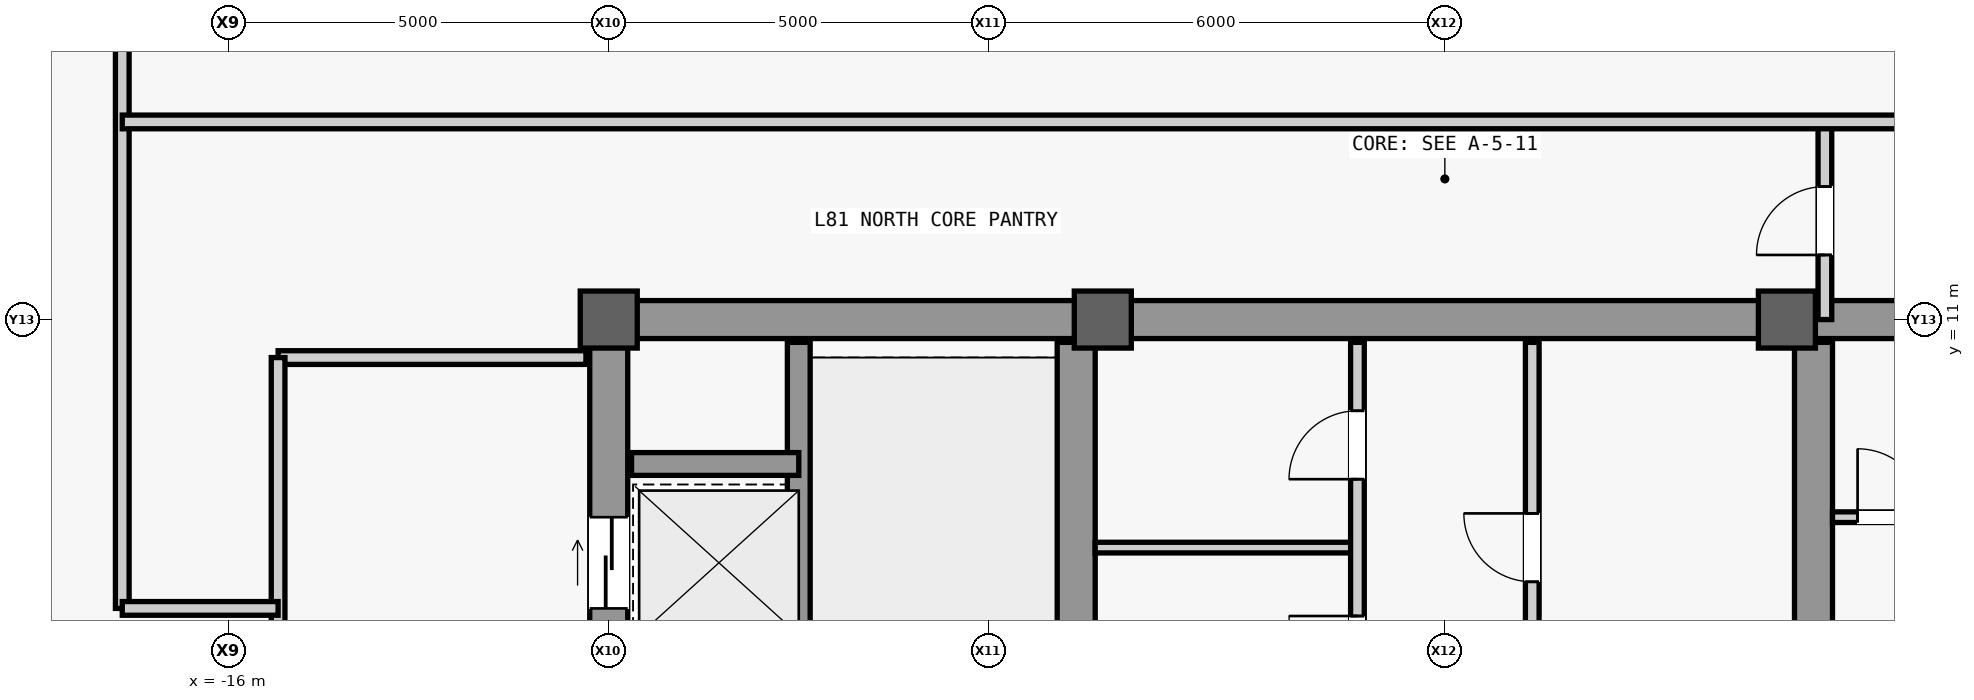
"""IFC4 building model, lengths in metres.
Left out: names, types, materials, properties, quantities, classifications, styles, units other than length and angle.
Written with IfcOpenShell. Run it as: python <this file> out.ifc"""

import sys

from ifc_helpers import new_model, si_unit, direction, frame, frame_2d, origin, origin_2d, place, context, subcontext, project, spatial, rectangle, extrude, source, transform, mapped, element, fill, save


model = new_model("IFC4")
c1 = context("Model", 3, precision=1e-05, world=origin(), true_north=direction((0.0, 1.0)))
c2 = subcontext(c1, "Body", "Model", "MODEL_VIEW")
j1 = project(units=[si_unit("LENGTHUNIT", "METRE"), si_unit("PLANEANGLEUNIT", "RADIAN")], contexts=[c1])
p1 = place(None, origin())
s1 = spatial("IfcSite", under=j1, at=p1, CompositionType="ELEMENT")
p2 = place(p1, origin())
s2 = spatial("IfcBuilding", under=s1, at=p2, CompositionType="ELEMENT")
p3 = place(p2, frame((0.0, 0.0, 342.3)))
s3 = spatial("IfcBuildingStorey", under=s2, at=p3, CompositionType="ELEMENT", Elevation=342.3)
m1 = source(origin(), c2, "Body", "SweptSolid", [
    extrude(rectangle(XDim=22.0, YDim=0.5, at=frame_2d((11.0, 0.0))), origin(), (0.0, 0.0, 1.0), 3.7),
])
p4 = place(p3, frame((-11.0, -11.0, 0.0), z_axis=(0.0, 0.0, 1.0), x_axis=(0.0, 1.0, 0.0)))
e1 = element("IfcWall", 1, at=p4, inside=s3, PredefinedType="SHEAR", context=c2, shape_type="MappedRepresentation", body=[
    mapped(m1, transform((0.0, 0.0, 0.0), scale=1.0)),
])
m2 = source(origin(), c2, "Body", "SweptSolid", [
    extrude(rectangle(XDim=1.1, YDim=2.2, at=frame_2d((0.55, 1.1))), frame((0.0, 0.26, 0.0), z_axis=(0.0, -1.0, 0.0), x_axis=(1.0, 0.0, 0.0)), (0.0, 0.0, 1.0), 0.52),
])
p5 = place(p4, frame((0.8, 0.0, 0.0)))
e2 = element("IfcOpeningElement", 2, at=p5, cuts=e1, PredefinedType="OPENING", context=c2, shape_type="MappedRepresentation", body=[
    mapped(m2, transform((0.0, 0.0, 0.0), scale=1.0)),
])
p6 = place(p4, frame((12.5, 0.0, 0.0)))
e3 = element("IfcOpeningElement", 3, at=p6, cuts=e1, PredefinedType="OPENING", context=c2, shape_type="MappedRepresentation", body=[
    mapped(m2, transform((0.0, 0.0, 0.0), scale=1.0)),
])
m3 = source(origin(), c2, "Body", "SweptSolid", [
    extrude(rectangle(XDim=0.9, YDim=2.15, at=frame_2d((0.45, 1.075))), frame((0.0, 0.26, 0.0), z_axis=(0.0, -1.0, 0.0), x_axis=(1.0, 0.0, 0.0)), (0.0, 0.0, 1.0), 0.52),
])
p7 = place(p4, frame((6.2, 0.0, 0.0)))
e4 = element("IfcOpeningElement", 4, at=p7, cuts=e1, PredefinedType="OPENING", context=c2, shape_type="MappedRepresentation", body=[
    mapped(m3, transform((0.0, 0.0, 0.0), scale=1.0)),
])
p8 = place(p4, frame((8.05, 0.0, 0.0)))
e5 = element("IfcOpeningElement", 5, at=p8, cuts=e1, PredefinedType="OPENING", context=c2, shape_type="MappedRepresentation", body=[
    mapped(m3, transform((0.0, 0.0, 0.0), scale=1.0)),
])
m4 = source(origin(), c2, "Body", "SweptSolid", [
    extrude(rectangle(XDim=1.2, YDim=2.3, at=frame_2d((0.6, 1.15))), frame((0.0, 0.26, 0.0), z_axis=(0.0, -1.0, 0.0), x_axis=(1.0, 0.0, 0.0)), (0.0, 0.0, 1.0), 0.52),
])
p9 = place(p4, frame((14.6, 0.0, 0.0)))
e6 = element("IfcOpeningElement", 6, at=p9, cuts=e1, PredefinedType="OPENING", context=c2, shape_type="MappedRepresentation", body=[
    mapped(m4, transform((0.0, 0.0, 0.0), scale=1.0)),
])
p10 = place(p4, frame((18.2, 0.0, 0.0)))
e7 = element("IfcOpeningElement", 7, at=p10, cuts=e1, PredefinedType="OPENING", context=c2, shape_type="MappedRepresentation", body=[
    mapped(m4, transform((0.0, 0.0, 0.0), scale=1.0)),
])
m5 = source(origin(), c2, "Body", "SweptSolid", [
    extrude(rectangle(XDim=1.3, YDim=2.3, at=frame_2d((0.65, 1.15))), frame((0.0, 0.26, 0.0), z_axis=(0.0, -1.0, 0.0), x_axis=(1.0, 0.0, 0.0)), (0.0, 0.0, 1.0), 0.52),
])
p11 = place(p4, frame((2.7, 0.0, 0.0)))
e8 = element("IfcOpeningElement", 8, at=p11, cuts=e1, PredefinedType="OPENING", context=c2, shape_type="MappedRepresentation", body=[
    mapped(m5, transform((0.0, 0.0, 0.0), scale=1.0)),
])
m6 = source(origin(), c2, "Body", "SweptSolid", [
    extrude(rectangle(XDim=21.4, YDim=0.5, at=frame_2d((10.7, 0.0))), origin(), (0.0, 0.0, 1.0), 3.7),
])
for number, where, z_axis, x_axis in (
    (9, (-4.85, -10.7, 0.0), (0.0, 0.0, 1.0), (0.0, 1.0, 0.0)),
    (10, (4.85, -10.7, 0.0), (0.0, 0.0, 1.0), (0.0, 1.0, 0.0)),
):
    element("IfcWall", number, at=place(p3, frame(where, z_axis=z_axis, x_axis=x_axis)), inside=s3, PredefinedType="SHEAR", context=c2, shape_type="MappedRepresentation", body=[
        mapped(m6, transform((0.0, 0.0, 0.0), scale=1.0)),
    ])
m7 = source(origin(), c2, "Body", "SweptSolid", [
    extrude(rectangle(XDim=5.9, YDim=0.5, at=frame_2d((2.95, 0.0))), origin(), (0.0, 0.0, 1.0), 3.7),
])
p12 = place(p3, frame((-10.75, 11.0, 0.0), z_axis=(0.0, 0.0, 1.0), x_axis=(1.0, 0.0, 0.0)))
e11 = element("IfcWall", 11, at=p12, inside=s3, PredefinedType="SHEAR", context=c2, shape_type="MappedRepresentation", body=[
    mapped(m7, transform((0.0, 0.0, 0.0), scale=1.0)),
])
p13 = place(p3, frame((4.85, 11.0, 0.0), z_axis=(0.0, 0.0, 1.0), x_axis=(1.0, 0.0, 0.0)))
e12 = element("IfcWall", 12, at=p13, inside=s3, PredefinedType="SHEAR", context=c2, shape_type="MappedRepresentation", body=[
    mapped(m7, transform((0.0, 0.0, 0.0), scale=1.0)),
])
m8 = source(origin(), c2, "Body", "SweptSolid", [
    extrude(rectangle(XDim=1.05, YDim=2.2, at=frame_2d((0.525, 1.1))), frame((0.0, 0.26, 0.0), z_axis=(0.0, -1.0, 0.0), x_axis=(1.0, 0.0, 0.0)), (0.0, 0.0, 1.0), 0.52),
])
p14 = place(p13, frame((1.375, 0.0, 0.0)))
e13 = element("IfcOpeningElement", 13, at=p14, cuts=e12, PredefinedType="OPENING", context=c2, shape_type="MappedRepresentation", body=[
    mapped(m8, transform((0.0, 0.0, 0.0), scale=1.0)),
])
m9 = source(origin(), c2, "Body", "SweptSolid", [
    extrude(rectangle(XDim=9.2, YDim=0.5, at=frame_2d((4.6, 0.0))), origin(), (0.0, 0.0, 1.0), 3.7),
])
p15 = place(p3, frame((-4.6, 11.0, 0.0), z_axis=(0.0, 0.0, 1.0), x_axis=(1.0, 0.0, 0.0)))
e14 = element("IfcWall", 14, at=p15, inside=s3, PredefinedType="SHEAR", context=c2, shape_type="MappedRepresentation", body=[
    mapped(m9, transform((0.0, 0.0, 0.0), scale=1.0)),
])
m10 = source(origin(), c2, "Body", "SweptSolid", [
    extrude(rectangle(XDim=0.75, YDim=0.75, at=origin_2d()), origin(), (0.0, 0.0, 1.0), 4.0),
])
for number, where, z_axis, x_axis in (
    (15, (-11.0, 11.0, 0.0), (0.0, 0.0, 1.0), (1.0, 0.0, 0.0)),
    (16, (-4.5, 11.0, 0.0), (0.0, 0.0, 1.0), (1.0, 0.0, 0.0)),
    (17, (4.5, 11.0, 0.0), (0.0, 0.0, 1.0), (1.0, 0.0, 0.0)),
):
    element("IfcColumn", number, at=place(p3, frame(where, z_axis=z_axis, x_axis=x_axis)), inside=s3, PredefinedType="COLUMN", context=c2, shape_type="MappedRepresentation", body=[
        mapped(m10, transform((0.0, 0.0, 0.0), scale=1.0)),
    ])
m11 = source(origin(), c2, "Body", "SweptSolid", [
    extrude(rectangle(XDim=7.75, YDim=0.3, at=frame_2d((3.875, 0.0))), origin(), (0.0, 0.0, 1.0), 3.7),
])
p16 = place(p3, frame((-8.5, 2.95, 0.0), z_axis=(0.0, 0.0, 1.0), x_axis=(0.0, 1.0, 0.0)))
e18 = element("IfcWall", 18, at=p16, inside=s3, PredefinedType="SHEAR", context=c2, shape_type="MappedRepresentation", body=[
    mapped(m11, transform((0.0, 0.0, 0.0), scale=1.0)),
])
m12 = source(origin(), c2, "Body", "SweptSolid", [
    extrude(rectangle(XDim=2.2, YDim=0.3, at=frame_2d((1.1, 0.0))), origin(), (0.0, 0.0, 1.0), 3.7),
])
p17 = place(p3, frame((-10.7, 9.1, 0.0), z_axis=(0.0, 0.0, 1.0), x_axis=(1.0, 0.0, 0.0)))
e19 = element("IfcWall", 19, at=p17, inside=s3, PredefinedType="SHEAR", context=c2, shape_type="MappedRepresentation", body=[
    mapped(m12, transform((0.0, 0.0, 0.0), scale=1.0)),
])
m13 = source(origin(), c2, "Body", "SweptSolid", [
    extrude(rectangle(XDim=3.15, YDim=0.14, at=frame_2d((1.575, 0.0))), origin(), (0.0, 0.0, 1.0), 3.7),
])
p18 = place(p3, frame((5.1, 8.4, 0.0), z_axis=(0.0, 0.0, 1.0), x_axis=(1.0, 0.0, 0.0)))
e20 = element("IfcWall", 20, at=p18, inside=s3, PredefinedType="PARTITIONING", context=c2, shape_type="MappedRepresentation", body=[
    mapped(m13, transform((0.0, 0.0, 0.0), scale=1.0)),
])
m14 = source(origin(), c2, "Body", "SweptSolid", [
    extrude(rectangle(XDim=0.9, YDim=2.15, at=frame_2d((0.45, 1.075))), frame((0.0, 0.08, 0.0), z_axis=(0.0, -1.0, 0.0), x_axis=(1.0, 0.0, 0.0)), (0.0, 0.0, 1.0), 0.16),
])
p19 = place(p18, frame((0.33, 0.0, 0.0)))
e21 = element("IfcOpeningElement", 21, at=p19, cuts=e20, PredefinedType="OPENING", context=c2, shape_type="MappedRepresentation", body=[
    mapped(m14, transform((0.0, 0.0, 0.0), scale=1.0)),
])
p20 = place(p18, frame((1.9, 0.0, 0.0)))
e22 = element("IfcOpeningElement", 22, at=p20, cuts=e20, PredefinedType="OPENING", context=c2, shape_type="MappedRepresentation", body=[
    mapped(m14, transform((0.0, 0.0, 0.0), scale=1.0)),
])
m15 = source(origin(), c2, "Body", "SweptSolid", [
    extrude(rectangle(XDim=4.05, YDim=0.18, at=frame_2d((2.025, 0.0))), origin(), (0.0, 0.0, 1.0), 3.7),
])
p21 = place(p3, frame((-15.35, 10.5, 0.0), z_axis=(0.0, 0.0, 1.0), x_axis=(1.0, 0.0, 0.0)))
e23 = element("IfcWall", 23, at=p21, inside=s3, PredefinedType="PARTITIONING", context=c2, shape_type="MappedRepresentation", body=[
    mapped(m15, transform((0.0, 0.0, 0.0), scale=1.0)),
])
m16 = source(origin(), c2, "Body", "SweptSolid", [
    extrude(rectangle(XDim=16.6, YDim=0.18, at=frame_2d((8.3, 0.0))), origin(), (0.0, 0.0, 1.0), 3.7),
])
p22 = place(p3, frame((-15.35, -6.1, 0.0), z_axis=(0.0, 0.0, 1.0), x_axis=(0.0, 1.0, 0.0)))
e24 = element("IfcWall", 24, at=p22, inside=s3, PredefinedType="PARTITIONING", context=c2, shape_type="MappedRepresentation", body=[
    mapped(m16, transform((0.0, 0.0, 0.0), scale=1.0)),
])
m17 = source(origin(), c2, "Body", "SweptSolid", [
    extrude(rectangle(XDim=1.8, YDim=2.25, at=frame_2d((0.9, 1.125))), frame((0.0, 0.1, 0.0), z_axis=(0.0, -1.0, 0.0), x_axis=(1.0, 0.0, 0.0)), (0.0, 0.0, 1.0), 0.2),
])
p23 = place(p22, frame((2.7, 0.0, 0.0)))
e25 = element("IfcOpeningElement", 25, at=p23, cuts=e24, PredefinedType="OPENING", context=c2, shape_type="MappedRepresentation", body=[
    mapped(m17, transform((0.0, 0.0, 0.0), scale=1.0)),
])
p24 = place(p22, frame((11.0, 0.0, 0.0)))
e26 = element("IfcOpeningElement", 26, at=p24, cuts=e24, PredefinedType="OPENING", context=c2, shape_type="MappedRepresentation", body=[
    mapped(m17, transform((0.0, 0.0, 0.0), scale=1.0)),
])
m18 = source(origin(), c2, "Body", "SweptSolid", [
    extrude(rectangle(XDim=3.45, YDim=0.14, at=frame_2d((1.725, 0.0))), origin(), (0.0, 0.0, 1.0), 3.7),
])
p25 = place(p3, frame((-4.6, 8.0, 0.0), z_axis=(0.0, 0.0, 1.0), x_axis=(1.0, 0.0, 0.0)))
e27 = element("IfcWall", 27, at=p25, inside=s3, PredefinedType="PARTITIONING", context=c2, shape_type="MappedRepresentation", body=[
    mapped(m18, transform((0.0, 0.0, 0.0), scale=1.0)),
])
m19 = source(origin(), c2, "Body", "SweptSolid", [
    extrude(rectangle(XDim=5.4, YDim=0.18, at=frame_2d((2.7, 0.0))), origin(), (0.0, 0.0, 1.0), 3.7),
])
p26 = place(p3, frame((-1.15, 5.3, 0.0), z_axis=(0.0, 0.0, 1.0), x_axis=(0.0, 1.0, 0.0)))
e28 = element("IfcWall", 28, at=p26, inside=s3, PredefinedType="PARTITIONING", context=c2, shape_type="MappedRepresentation", body=[
    mapped(m19, transform((0.0, 0.0, 0.0), scale=1.0)),
])
m20 = source(origin(), c2, "Body", "SweptSolid", [
    extrude(rectangle(XDim=0.9, YDim=2.15, at=frame_2d((0.45, 1.075))), frame((0.0, 0.1, 0.0), z_axis=(0.0, -1.0, 0.0), x_axis=(1.0, 0.0, 0.0)), (0.0, 0.0, 1.0), 0.2),
])
p27 = place(p26, frame((0.9, 0.0, 0.0)))
e29 = element("IfcOpeningElement", 29, at=p27, cuts=e28, PredefinedType="OPENING", context=c2, shape_type="MappedRepresentation", body=[
    mapped(m20, transform((0.0, 0.0, 0.0), scale=1.0)),
])
p28 = place(p26, frame((3.6, 0.0, 0.0)))
e30 = element("IfcOpeningElement", 30, at=p28, cuts=e28, PredefinedType="OPENING", context=c2, shape_type="MappedRepresentation", body=[
    mapped(m20, transform((0.0, 0.0, 0.0), scale=1.0)),
])
p29 = place(p3, frame((1.15, 5.3, 0.0), z_axis=(0.0, 0.0, 1.0), x_axis=(0.0, 1.0, 0.0)))
e31 = element("IfcWall", 31, at=p29, inside=s3, PredefinedType="PARTITIONING", context=c2, shape_type="MappedRepresentation", body=[
    mapped(m19, transform((0.0, 0.0, 0.0), scale=1.0)),
])
p30 = place(p29, frame((2.25, 0.0, 0.0)))
e32 = element("IfcOpeningElement", 32, at=p30, cuts=e31, PredefinedType="OPENING", context=c2, shape_type="MappedRepresentation", body=[
    mapped(m20, transform((0.0, 0.0, 0.0), scale=1.0)),
])
m21 = source(origin(), c2, "Body", "SweptSolid", [
    extrude(rectangle(XDim=8.4, YDim=0.18, at=frame_2d((4.2, 0.0))), origin(), (0.0, 0.0, 1.0), 3.7),
])
p31 = place(p3, frame((-17.4, 7.2, 0.0), z_axis=(0.0, 0.0, 1.0), x_axis=(0.0, 1.0, 0.0)))
e33 = element("IfcWall", 33, at=p31, inside=s3, PredefinedType="PARTITIONING", context=c2, shape_type="MappedRepresentation", body=[
    mapped(m21, transform((0.0, 0.0, 0.0), scale=1.0)),
])
m22 = source(origin(), c2, "Body", "SweptSolid", [
    extrude(rectangle(XDim=2.05, YDim=0.18, at=frame_2d((1.025, 0.0))), origin(), (0.0, 0.0, 1.0), 3.7),
])
p32 = place(p3, frame((-17.4, 7.2, 0.0), z_axis=(0.0, 0.0, 1.0), x_axis=(1.0, 0.0, 0.0)))
e34 = element("IfcWall", 34, at=p32, inside=s3, PredefinedType="PARTITIONING", context=c2, shape_type="MappedRepresentation", body=[
    mapped(m22, transform((0.0, 0.0, 0.0), scale=1.0)),
])
m23 = source(origin(), c2, "Body", "SweptSolid", [
    extrude(rectangle(XDim=2.6, YDim=0.18, at=frame_2d((1.3, 0.0))), origin(), (0.0, 0.0, 1.0), 3.7),
])
p33 = place(p3, frame((5.0, 11.0, 0.0), z_axis=(0.0, 0.0, 1.0), x_axis=(0.0, 1.0, 0.0)))
e35 = element("IfcWall", 35, at=p33, inside=s3, PredefinedType="PARTITIONING", context=c2, shape_type="MappedRepresentation", body=[
    mapped(m23, transform((0.0, 0.0, 0.0), scale=1.0)),
])
p34 = place(p33, frame((0.85, 0.0, 0.0)))
e36 = element("IfcOpeningElement", 36, at=p34, cuts=e35, PredefinedType="OPENING", context=c2, shape_type="MappedRepresentation", body=[
    mapped(m20, transform((0.0, 0.0, 0.0), scale=1.0)),
])
m24 = source(origin(), c2, "Body", "SweptSolid", [
    extrude(rectangle(XDim=32.75, YDim=0.18, at=frame_2d((16.375, 0.0))), origin(), (0.0, 0.0, 1.0), 3.7),
])
p35 = place(p3, frame((-17.4, 13.6, 0.0), z_axis=(0.0, 0.0, 1.0), x_axis=(1.0, 0.0, 0.0)))
e37 = element("IfcWall", 37, at=p35, inside=s3, PredefinedType="PARTITIONING", context=c2, shape_type="MappedRepresentation", body=[
    mapped(m24, transform((0.0, 0.0, 0.0), scale=1.0)),
])
m25 = source(origin(), c2, "Body", "SweptSolid", [
    extrude(rectangle(XDim=1.05, YDim=2.2, at=frame_2d((0.525, 1.1))), frame((0.0, 0.1, 0.0), z_axis=(0.0, -1.0, 0.0), x_axis=(1.0, 0.0, 0.0)), (0.0, 0.0, 1.0), 0.2),
])
p36 = place(p35, frame((27.075, 0.0, 0.0)))
e38 = element("IfcOpeningElement", 38, at=p36, cuts=e37, PredefinedType="OPENING", context=c2, shape_type="MappedRepresentation", body=[
    mapped(m25, transform((0.0, 0.0, 0.0), scale=1.0)),
])
m26 = source(origin(), c2, "Body", "SweptSolid", [
    extrude(rectangle(XDim=0.9, YDim=2.15, at=frame_2d((0.45, 1.075))), frame((0.0, 0.025, 0.0), z_axis=(0.0, -1.0, 0.0), x_axis=(1.0, 0.0, 0.0)), (0.0, 0.0, 1.0), 0.05),
])
p37 = place(p19, origin())
e39 = element("IfcDoor", 39, at=p37, inside=s3, OperationType="SINGLE_SWING_LEFT", PredefinedType="DOOR", context=c2, shape_type="MappedRepresentation", body=[
    mapped(m26, transform((0.0, 0.0, 0.0), scale=1.0)),
])
fill(e21, e39)
p38 = place(p27, origin())
e40 = element("IfcDoor", 40, at=p38, inside=s3, OperationType="SINGLE_SWING_RIGHT", PredefinedType="DOOR", context=c2, shape_type="MappedRepresentation", body=[
    mapped(m26, transform((0.0, 0.0, 0.0), scale=1.0)),
])
fill(e29, e40)
p39 = place(p28, origin())
e41 = element("IfcDoor", 41, at=p39, inside=s3, OperationType="SINGLE_SWING_LEFT", PredefinedType="DOOR", context=c2, shape_type="MappedRepresentation", body=[
    mapped(m26, transform((0.0, 0.0, 0.0), scale=1.0)),
])
fill(e30, e41)
p40 = place(p30, origin())
e42 = element("IfcDoor", 42, at=p40, inside=s3, OperationType="SINGLE_SWING_RIGHT", PredefinedType="DOOR", context=c2, shape_type="MappedRepresentation", body=[
    mapped(m26, transform((0.0, 0.0, 0.0), scale=1.0)),
])
fill(e32, e42)
p41 = place(p34, origin())
e43 = element("IfcDoor", 43, at=p41, inside=s3, OperationType="SINGLE_SWING_LEFT", PredefinedType="DOOR", context=c2, shape_type="MappedRepresentation", body=[
    mapped(m26, transform((0.0, 0.0, 0.0), scale=1.0)),
])
fill(e36, e43)
m27 = source(origin(), c2, "Body", "SweptSolid", [
    extrude(rectangle(XDim=1.2, YDim=2.3, at=frame_2d((0.6, 1.15))), frame((0.0, 0.025, 0.0), z_axis=(0.0, -1.0, 0.0), x_axis=(1.0, 0.0, 0.0)), (0.0, 0.0, 1.0), 0.05),
])
p42 = place(p10, origin())
e44 = element("IfcDoor", 44, at=p42, inside=s3, OperationType="SLIDING_TO_LEFT", PredefinedType="DOOR", context=c2, shape_type="MappedRepresentation", body=[
    mapped(m27, transform((0.0, 0.0, 0.0), scale=1.0)),
])
fill(e7, e44)
save(model, sys.argv[1])
